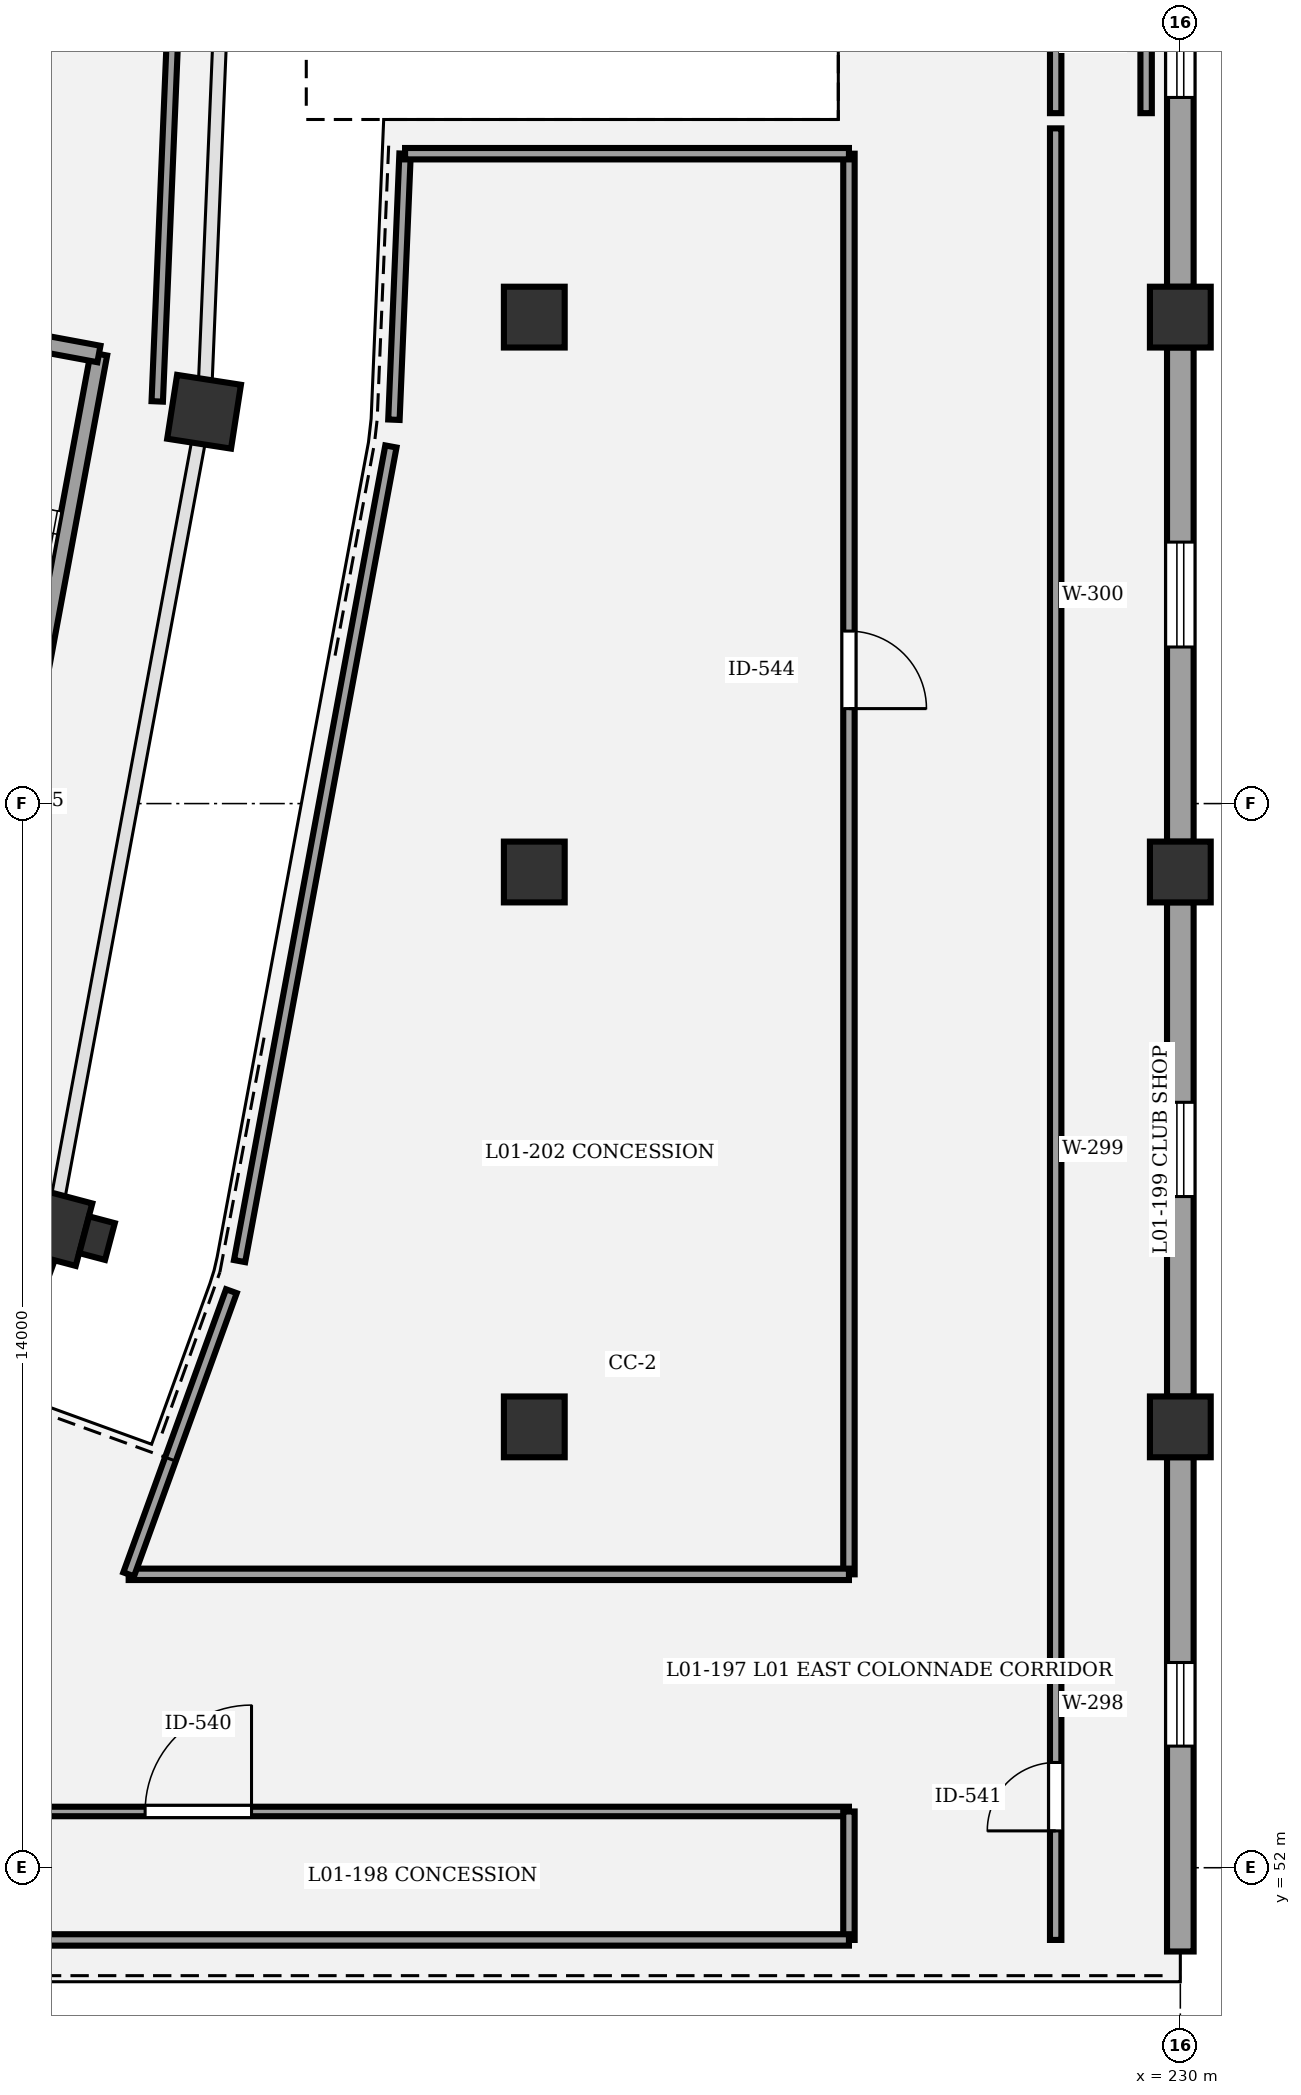
"""IFC4 building model, lengths in metres.
Left out: names, types, materials, properties, quantities, classifications, styles, units other than length and angle.
Written with IfcOpenShell. Run it as: python <this file> out.ifc"""

import sys

from ifc_helpers import new_model, si_unit, direction, frame, frame_2d, origin, origin_2d, place, context, subcontext, project, spatial, rectangle, circle, extrude, element, fill, save


model = new_model("IFC4")
c1 = context("Model", 3, precision=1e-05, world=origin(), true_north=direction((0.0, 1.0)))
c2 = subcontext(c1, "Body", "Model", "MODEL_VIEW")
j1 = project(units=[si_unit("LENGTHUNIT", "METRE"), si_unit("PLANEANGLEUNIT", "RADIAN")], contexts=[c1])
p1 = place(None, origin())
s1 = spatial("IfcSite", under=j1, at=p1, CompositionType="ELEMENT")
p2 = place(p1, origin())
s2 = spatial("IfcBuilding", under=s1, at=p2, CompositionType="ELEMENT")
p3 = place(p2, frame((0.0, 0.0, 5.4)))
s3 = spatial("IfcBuildingStorey", under=s2, at=p3, CompositionType="ELEMENT", Elevation=5.4)
p4 = place(p3, frame((215.165, 60.438, 0.0), z_axis=(0.0, 0.0, 1.0), x_axis=(0.966600102017, -0.256289373133, 0.0)))
e1 = element("IfcColumn", 1, at=p4, inside=s3, PredefinedType="COLUMN", context=c2, shape_type="SweptSolid", body=[
    extrude(rectangle(XDim=0.85, YDim=0.85, at=origin_2d()), origin(), (0.0, 0.0, 1.0), 4.8),
])
p5 = place(p3, frame((215.748, 60.283, 0.0), z_axis=(0.0, 0.0, 1.0), x_axis=(0.256289373133, 0.966600102017, 0.0)))
e2 = element("IfcColumn", 2, at=p5, inside=s3, PredefinedType="PILASTER", context=c2, shape_type="SweptSolid", body=[
    extrude(rectangle(XDim=0.5, YDim=0.35, at=origin_2d()), origin(), (0.0, 0.0, 1.0), 4.8),
])
p6 = place(p3, frame((217.156, 71.155, 0.0), z_axis=(0.0, 0.0, 1.0), x_axis=(0.98817491911, -0.153330783737, 0.0)))
e3 = element("IfcColumn", 3, at=p6, inside=s3, PredefinedType="COLUMN", context=c2, shape_type="SweptSolid", body=[
    extrude(rectangle(XDim=0.85, YDim=0.85, at=origin_2d()), origin(), (0.0, 0.0, 1.0), 4.8),
])
for number, where, z_axis, x_axis in (
    (4, (221.5, 57.8, 0.0), (0.0, 0.0, 1.0), (1.0, 0.0, 0.0)),
    (5, (221.5, 65.1, 0.0), (0.0, 0.0, 1.0), (1.0, 0.0, 0.0)),
    (6, (221.5, 72.4, 0.0), (0.0, 0.0, 1.0), (1.0, 0.0, 0.0)),
    (7, (230.0, 57.8, 0.0), (0.0, 0.0, 1.0), (1.0, 0.0, 0.0)),
    (8, (230.0, 65.1, 0.0), (0.0, 0.0, 1.0), (1.0, 0.0, 0.0)),
    (9, (230.0, 72.4, 0.0), (0.0, 0.0, 1.0), (1.0, 0.0, 0.0)),
):
    element("IfcColumn", number, at=place(p3, frame(where, z_axis=z_axis, x_axis=x_axis)), inside=s3, PredefinedType="COLUMN", context=c2, shape_type="SweptSolid", body=[
        extrude(circle(Radius=0.4, at=origin_2d()), origin(), (0.0, 0.0, 1.0), 4.8),
    ])
p7 = place(p3, frame((215.02, 60.04, 0.0), z_axis=(0.0, 0.0, 1.0), x_axis=(-0.341014666885, -0.940057975324, 0.0)))
e10 = element("IfcWall", 10, at=p7, inside=s3, PredefinedType="STANDARD", context=c2, shape_type="SweptSolid", body=[
    extrude(rectangle(XDim=8.855, YDim=0.35, at=frame_2d((4.428, 0.0))), origin(), (0.0, 0.0, 1.0), 3.57),
])
p8 = place(p7, frame((3.528, 0.0, 0.0)))
e11 = element("IfcOpeningElement", 11, at=p8, cuts=e10, PredefinedType="OPENING", context=c2, shape_type="SweptSolid", body=[
    extrude(rectangle(XDim=1.8, YDim=2.4, at=frame_2d((0.9, 1.2))), frame((0.0, 0.185, 0.0), z_axis=(0.0, -1.0, 0.0), x_axis=(1.0, 0.0, 0.0)), (0.0, 0.0, 1.0), 0.37),
])
p9 = place(p3, frame((230.0, 57.402, 0.0), z_axis=(0.0, 0.0, 1.0), x_axis=(0.0, -1.0, 0.0)))
e12 = element("IfcWall", 12, at=p9, inside=s3, PredefinedType="STANDARD", context=c2, shape_type="SweptSolid", body=[
    extrude(rectangle(XDim=6.504, YDim=0.35, at=frame_2d((3.252, 0.0))), origin(), (0.0, 0.0, 1.0), 3.56),
])
p10 = place(p9, frame((2.702, 0.0, 0.9)))
e13 = element("IfcOpeningElement", 13, at=p10, cuts=e12, PredefinedType="OPENING", context=c2, shape_type="SweptSolid", body=[
    extrude(rectangle(XDim=1.1, YDim=2.15, at=frame_2d((0.55, 1.075))), frame((0.0, 0.185, 0.0), z_axis=(0.0, -1.0, 0.0), x_axis=(1.0, 0.0, 0.0)), (0.0, 0.0, 1.0), 0.37),
])
p11 = place(p3, frame((230.0, 64.702, 0.0), z_axis=(0.0, 0.0, 1.0), x_axis=(0.0, -1.0, 0.0)))
e14 = element("IfcWall", 14, at=p11, inside=s3, PredefinedType="STANDARD", context=c2, shape_type="SweptSolid", body=[
    extrude(rectangle(XDim=6.504, YDim=0.35, at=frame_2d((3.252, 0.0))), origin(), (0.0, 0.0, 1.0), 3.56),
])
p12 = place(p11, frame((2.632, 0.0, 0.9)))
e15 = element("IfcOpeningElement", 15, at=p12, cuts=e14, PredefinedType="OPENING", context=c2, shape_type="SweptSolid", body=[
    extrude(rectangle(XDim=1.24, YDim=2.15, at=frame_2d((0.62, 1.075))), frame((0.0, 0.185, 0.0), z_axis=(0.0, -1.0, 0.0), x_axis=(1.0, 0.0, 0.0)), (0.0, 0.0, 1.0), 0.37),
])
p13 = place(p3, frame((230.0, 72.002, 0.0), z_axis=(0.0, 0.0, 1.0), x_axis=(0.0, -1.0, 0.0)))
e16 = element("IfcWall", 16, at=p13, inside=s3, PredefinedType="STANDARD", context=c2, shape_type="SweptSolid", body=[
    extrude(rectangle(XDim=6.504, YDim=0.35, at=frame_2d((3.252, 0.0))), origin(), (0.0, 0.0, 1.0), 3.56),
])
p14 = place(p13, frame((2.562, 0.0, 0.9)))
e17 = element("IfcOpeningElement", 17, at=p14, cuts=e16, PredefinedType="OPENING", context=c2, shape_type="SweptSolid", body=[
    extrude(rectangle(XDim=1.38, YDim=2.15, at=frame_2d((0.69, 1.075))), frame((0.0, 0.185, 0.0), z_axis=(0.0, -1.0, 0.0), x_axis=(1.0, 0.0, 0.0)), (0.0, 0.0, 1.0), 0.37),
])
p15 = place(p3, frame((230.0, 79.302, 0.0), z_axis=(0.0, 0.0, 1.0), x_axis=(0.0, -1.0, 0.0)))
e18 = element("IfcWall", 18, at=p15, inside=s3, PredefinedType="STANDARD", context=c2, shape_type="SweptSolid", body=[
    extrude(rectangle(XDim=6.504, YDim=0.35, at=frame_2d((3.252, 0.0))), origin(), (0.0, 0.0, 1.0), 3.56),
])
p16 = place(p15, frame((2.492, 0.0, 0.9)))
e19 = element("IfcOpeningElement", 19, at=p16, cuts=e18, PredefinedType="OPENING", context=c2, shape_type="SweptSolid", body=[
    extrude(rectangle(XDim=1.52, YDim=2.15, at=frame_2d((0.76, 1.075))), frame((0.0, 0.185, 0.0), z_axis=(0.0, -1.0, 0.0), x_axis=(1.0, 0.0, 0.0)), (0.0, 0.0, 1.0), 0.37),
])
p17 = place(p3, frame((215.772, 71.915, 0.0), z_axis=(0.0, 0.0, 1.0), x_axis=(-0.182574755222, -0.983191974517, 0.0)))
e20 = element("IfcWall", 20, at=p17, inside=s3, PredefinedType="SHEAR", context=c2, shape_type="SweptSolid", body=[
    extrude(rectangle(XDim=11.02, YDim=0.22, at=frame_2d((5.51, 0.0))), origin(), (0.0, 0.0, 1.0), 4.55),
])
p18 = place(p3, frame((211.436, 72.72, 0.0), z_axis=(0.0, 0.0, 1.0), x_axis=(0.983179789985, -0.182640358532, 0.0)))
e21 = element("IfcWall", 21, at=p18, inside=s3, PredefinedType="SHEAR", context=c2, shape_type="SweptSolid", body=[
    extrude(rectangle(XDim=4.41, YDim=0.22, at=frame_2d((2.205, 0.0))), origin(), (0.0, 0.0, 1.0), 4.55),
])
p19 = place(p3, frame((215.031, 52.74, 0.0), z_axis=(0.0, 0.0, 1.0), x_axis=(1.0, 0.0, 0.0)))
e22 = element("IfcWall", 22, at=p19, inside=s3, PredefinedType="PARTITIONING", context=c2, shape_type="SweptSolid", body=[
    extrude(rectangle(XDim=10.608, YDim=0.125, at=frame_2d((5.304, 0.0))), origin(), (0.0, 0.0, 1.0), 3.55),
])
p20 = place(p19, frame((1.348, 0.0, 0.0)))
e23 = element("IfcOpeningElement", 23, at=p20, cuts=e22, PredefinedType="OPENING", context=c2, shape_type="SweptSolid", body=[
    extrude(rectangle(XDim=1.4, YDim=2.3, at=frame_2d((0.7, 1.15))), frame((0.0, 0.073, 0.0), z_axis=(0.0, -1.0, 0.0), x_axis=(1.0, 0.0, 0.0)), (0.0, 0.0, 1.0), 0.145),
])
p21 = place(p3, frame((228.36, 51.05, 0.0), z_axis=(0.0, 0.0, 1.0), x_axis=(0.0, 1.0, 0.0)))
e24 = element("IfcWall", 24, at=p21, inside=s3, PredefinedType="PARTITIONING", context=c2, shape_type="SweptSolid", body=[
    extrude(rectangle(XDim=23.833, YDim=0.15, at=frame_2d((11.917, 0.0))), origin(), (0.0, 0.0, 1.0), 3.55),
])
p22 = place(p21, frame((1.435, 0.0, 0.0)))
e25 = element("IfcOpeningElement", 25, at=p22, cuts=e24, PredefinedType="OPENING", context=c2, shape_type="SweptSolid", body=[
    extrude(rectangle(XDim=0.9, YDim=2.1, at=frame_2d((0.45, 1.05))), frame((0.0, 0.085, 0.0), z_axis=(0.0, -1.0, 0.0), x_axis=(1.0, 0.0, 0.0)), (0.0, 0.0, 1.0), 0.17),
])
p23 = place(p3, frame((228.36, 75.083, 0.0), z_axis=(0.0, 0.0, 1.0), x_axis=(0.0, 1.0, 0.0)))
e26 = element("IfcWall", 26, at=p23, inside=s3, PredefinedType="PARTITIONING", context=c2, shape_type="SweptSolid", body=[
    extrude(rectangle(XDim=23.833, YDim=0.15, at=frame_2d((11.917, 0.0))), origin(), (0.0, 0.0, 1.0), 3.55),
])
p24 = place(p23, frame((8.109, 0.0, 0.0)))
e27 = element("IfcOpeningElement", 27, at=p24, cuts=e26, PredefinedType="OPENING", context=c2, shape_type="SweptSolid", body=[
    extrude(rectangle(XDim=0.94, YDim=2.1, at=frame_2d((0.47, 1.05))), frame((0.0, 0.085, 0.0), z_axis=(0.0, -1.0, 0.0), x_axis=(1.0, 0.0, 0.0)), (0.0, 0.0, 1.0), 0.17),
])
p25 = place(p3, frame((225.64, 74.55, 0.0), z_axis=(0.0, 0.0, 1.0), x_axis=(0.0, -1.0, 0.0)))
e28 = element("IfcWall", 28, at=p25, inside=s3, PredefinedType="PARTITIONING", context=c2, shape_type="SweptSolid", body=[
    extrude(rectangle(XDim=18.69, YDim=0.15, at=frame_2d((9.345, 0.0))), origin(), (0.0, 0.0, 1.0), 3.55),
])
p26 = place(p25, frame((6.281, 0.0, 0.0)))
e29 = element("IfcOpeningElement", 29, at=p26, cuts=e28, PredefinedType="OPENING", context=c2, shape_type="SweptSolid", body=[
    extrude(rectangle(XDim=1.02, YDim=2.1, at=frame_2d((0.51, 1.05))), frame((0.0, 0.085, 0.0), z_axis=(0.0, -1.0, 0.0), x_axis=(1.0, 0.0, 0.0)), (0.0, 0.0, 1.0), 0.17),
])
p27 = place(p3, frame((217.196, 86.96, 0.0), z_axis=(0.0, 0.0, 1.0), x_axis=(-0.041907682199, -0.999121487194, 0.0)))
e30 = element("IfcWall", 30, at=p27, inside=s3, PredefinedType="PARTITIONING", context=c2, shape_type="SweptSolid", body=[
    extrude(rectangle(XDim=15.683, YDim=0.15, at=frame_2d((7.841, 0.0))), origin(), (0.0, 0.0, 1.0), 3.55),
])
p28 = place(p3, frame((225.64, 52.74, 0.0), z_axis=(0.0, 0.0, 1.0), x_axis=(0.0, -1.0, 0.0)))
e31 = element("IfcWall", 31, at=p28, inside=s3, PredefinedType="PARTITIONING", context=c2, shape_type="SweptSolid", body=[
    extrude(rectangle(XDim=1.69, YDim=0.15, at=frame_2d((0.845, 0.0))), origin(), (0.0, 0.0, 1.0), 3.55),
])
p29 = place(p3, frame((225.64, 51.05, 0.0), z_axis=(0.0, 0.0, 1.0), x_axis=(-1.0, 0.0, 0.0)))
e32 = element("IfcWall", 32, at=p29, inside=s3, PredefinedType="PARTITIONING", context=c2, shape_type="SweptSolid", body=[
    extrude(rectangle(XDim=11.221, YDim=0.15, at=frame_2d((5.611, 0.0))), origin(), (0.0, 0.0, 1.0), 3.55),
])
p30 = place(p3, frame((229.55, 98.917, 0.0), z_axis=(0.0, 0.0, 1.0), x_axis=(0.0, -1.0, 0.0)))
e33 = element("IfcWall", 33, at=p30, inside=s3, PredefinedType="PARTITIONING", context=c2, shape_type="SweptSolid", body=[
    extrude(rectangle(XDim=23.833, YDim=0.15, at=frame_2d((11.917, 0.0))), origin(), (0.0, 0.0, 1.0), 3.55),
])
p31 = place(p3, frame((217.623, 59.981, 0.0), z_axis=(0.0, 0.0, 1.0), x_axis=(0.182620957058, 0.983183393901, 0.0)))
e34 = element("IfcWall", 34, at=p31, inside=s3, PredefinedType="PARTITIONING", context=c2, shape_type="SweptSolid", body=[
    extrude(rectangle(XDim=10.901, YDim=0.15, at=frame_2d((5.45, 0.0))), origin(), (0.0, 0.0, 1.0), 3.55),
])
p32 = place(p3, frame((219.653, 71.05, 0.0), z_axis=(0.0, 0.0, 1.0), x_axis=(0.041888559174, 0.999122289117, 0.0)))
e35 = element("IfcWall", 35, at=p32, inside=s3, PredefinedType="PARTITIONING", context=c2, shape_type="SweptSolid", body=[
    extrude(rectangle(XDim=3.503, YDim=0.15, at=frame_2d((1.751, 0.0))), origin(), (0.0, 0.0, 1.0), 3.55),
])
p33 = place(p3, frame((219.8, 74.55, 0.0), z_axis=(0.0, 0.0, 1.0), x_axis=(1.0, 0.0, 0.0)))
e36 = element("IfcWall", 36, at=p33, inside=s3, PredefinedType="PARTITIONING", context=c2, shape_type="SweptSolid", body=[
    extrude(rectangle(XDim=5.84, YDim=0.15, at=frame_2d((2.92, 0.0))), origin(), (0.0, 0.0, 1.0), 3.55),
])
p34 = place(p3, frame((225.64, 55.86, 0.0), z_axis=(0.0, 0.0, 1.0), x_axis=(-1.0, 0.0, 0.0)))
e37 = element("IfcWall", 37, at=p34, inside=s3, PredefinedType="PARTITIONING", context=c2, shape_type="SweptSolid", body=[
    extrude(rectangle(XDim=9.477, YDim=0.15, at=frame_2d((4.738, 0.0))), origin(), (0.0, 0.0, 1.0), 3.55),
])
p35 = place(p3, frame((216.163, 55.86, 0.0), z_axis=(0.0, 0.0, 1.0), x_axis=(0.341035525383, 0.94005040845, 0.0)))
e38 = element("IfcWall", 38, at=p35, inside=s3, PredefinedType="PARTITIONING", context=c2, shape_type="SweptSolid", body=[
    extrude(rectangle(XDim=3.962, YDim=0.15, at=frame_2d((1.981, 0.0))), origin(), (0.0, 0.0, 1.0), 3.55),
])
p36 = place(p10, origin())
e39 = element("IfcWindow", 39, at=p36, inside=s3, PartitioningType="SINGLE_PANEL", PredefinedType="WINDOW", context=c2, shape_type="SweptSolid", body=[
    extrude(rectangle(XDim=1.1, YDim=2.15, at=frame_2d((0.55, 1.075))), frame((0.0, 0.03, 0.0), z_axis=(0.0, -1.0, 0.0), x_axis=(1.0, 0.0, 0.0)), (0.0, 0.0, 1.0), 0.06),
])
fill(e13, e39)
p37 = place(p12, origin())
e40 = element("IfcWindow", 40, at=p37, inside=s3, PartitioningType="SINGLE_PANEL", PredefinedType="WINDOW", context=c2, shape_type="SweptSolid", body=[
    extrude(rectangle(XDim=1.24, YDim=2.15, at=frame_2d((0.62, 1.075))), frame((0.0, 0.03, 0.0), z_axis=(0.0, -1.0, 0.0), x_axis=(1.0, 0.0, 0.0)), (0.0, 0.0, 1.0), 0.06),
])
fill(e15, e40)
p38 = place(p14, origin())
e41 = element("IfcWindow", 41, at=p38, inside=s3, PartitioningType="SINGLE_PANEL", PredefinedType="WINDOW", context=c2, shape_type="SweptSolid", body=[
    extrude(rectangle(XDim=1.38, YDim=2.15, at=frame_2d((0.69, 1.075))), frame((0.0, 0.03, 0.0), z_axis=(0.0, -1.0, 0.0), x_axis=(1.0, 0.0, 0.0)), (0.0, 0.0, 1.0), 0.06),
])
fill(e17, e41)
p39 = place(p16, origin())
e42 = element("IfcWindow", 42, at=p39, inside=s3, PartitioningType="SINGLE_PANEL", PredefinedType="WINDOW", context=c2, shape_type="SweptSolid", body=[
    extrude(rectangle(XDim=1.52, YDim=2.15, at=frame_2d((0.76, 1.075))), frame((0.0, 0.03, 0.0), z_axis=(0.0, -1.0, 0.0), x_axis=(1.0, 0.0, 0.0)), (0.0, 0.0, 1.0), 0.06),
])
fill(e19, e42)
p40 = place(p20, origin())
e43 = element("IfcDoor", 43, at=p40, inside=s3, OperationType="SINGLE_SWING_RIGHT", PredefinedType="DOOR", context=c2, shape_type="SweptSolid", body=[
    extrude(rectangle(XDim=1.4, YDim=2.3, at=frame_2d((0.7, 1.15))), frame((0.0, 0.025, 0.0), z_axis=(0.0, -1.0, 0.0), x_axis=(1.0, 0.0, 0.0)), (0.0, 0.0, 1.0), 0.05),
])
fill(e23, e43)
p41 = place(p22, origin())
e44 = element("IfcDoor", 44, at=p41, inside=s3, OperationType="SINGLE_SWING_LEFT", PredefinedType="DOOR", context=c2, shape_type="SweptSolid", body=[
    extrude(rectangle(XDim=0.9, YDim=2.1, at=frame_2d((0.45, 1.05))), frame((0.0, 0.025, 0.0), z_axis=(0.0, -1.0, 0.0), x_axis=(1.0, 0.0, 0.0)), (0.0, 0.0, 1.0), 0.05),
])
fill(e25, e44)
p42 = place(p26, origin())
e45 = element("IfcDoor", 45, at=p42, inside=s3, OperationType="SINGLE_SWING_RIGHT", PredefinedType="DOOR", context=c2, shape_type="SweptSolid", body=[
    extrude(rectangle(XDim=1.02, YDim=2.1, at=frame_2d((0.51, 1.05))), frame((0.0, 0.025, 0.0), z_axis=(0.0, -1.0, 0.0), x_axis=(1.0, 0.0, 0.0)), (0.0, 0.0, 1.0), 0.05),
])
fill(e29, e45)
save(model, sys.argv[1])
